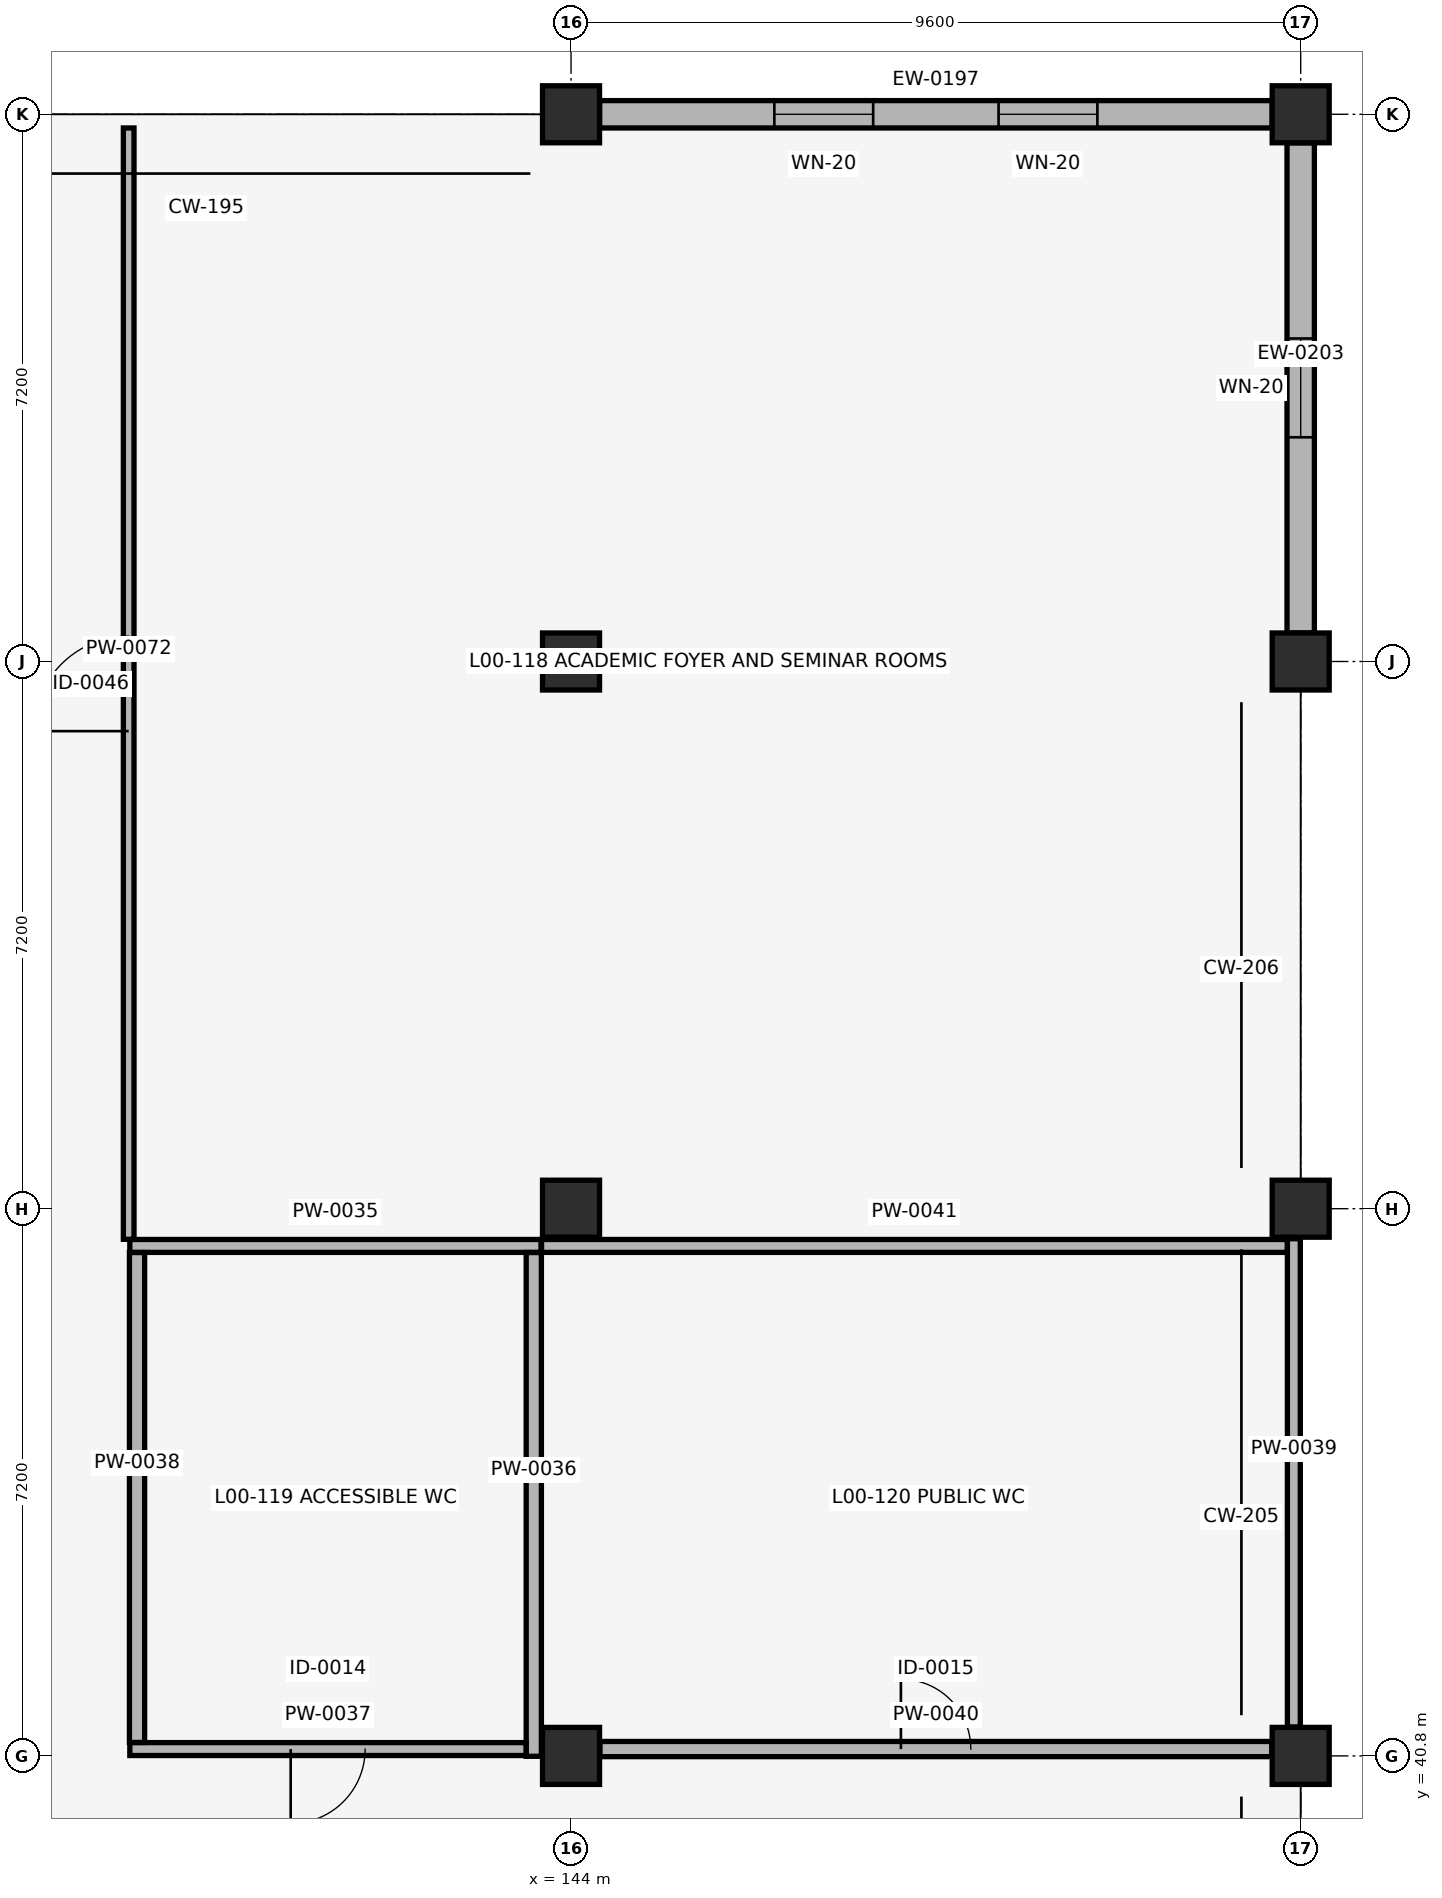
"""IFC4 building model, lengths in metres.
Left out: names, types, materials, properties, quantities, classifications, styles, units other than length and angle.
Written with IfcOpenShell. Run it as: python <this file> out.ifc"""

import sys

from ifc_helpers import new_model, si_unit, direction, frame, frame_2d, origin, origin_2d, place, context, subcontext, project, spatial, rectangle, circle, extrude, element, fill, save


model = new_model("IFC4")
c1 = context("Model", 3, precision=1e-05, world=origin(), true_north=direction((0.0, 1.0)))
c2 = subcontext(c1, "Body", "Model", "MODEL_VIEW")
j1 = project(units=[si_unit("LENGTHUNIT", "METRE"), si_unit("PLANEANGLEUNIT", "RADIAN")], contexts=[c1])
p1 = place(None, origin())
s1 = spatial("IfcSite", under=j1, at=p1, CompositionType="ELEMENT")
p2 = place(p1, origin())
s2 = spatial("IfcBuilding", under=s1, at=p2, CompositionType="ELEMENT")
p3 = place(p2, origin())
s3 = spatial("IfcBuildingStorey", under=s2, at=p3, CompositionType="ELEMENT", Elevation=0.0)
for number, where, z_axis, x_axis in (
    (1, (144.0, 40.8, -0.44), (0.0, 0.0, 1.0), (1.0, 0.0, 0.0)),
    (2, (144.0, 48.0, -0.44), (0.0, 0.0, 1.0), (1.0, 0.0, 0.0)),
    (3, (144.0, 55.2, -0.44), (0.0, 0.0, 1.0), (1.0, 0.0, 0.0)),
    (4, (144.0, 62.4, -0.44), (0.0, 0.0, 1.0), (1.0, 0.0, 0.0)),
    (5, (153.6, 40.8, -0.44), (0.0, 0.0, 1.0), (1.0, 0.0, 0.0)),
    (6, (153.6, 48.0, -0.44), (0.0, 0.0, 1.0), (1.0, 0.0, 0.0)),
    (7, (153.6, 55.2, -0.44), (0.0, 0.0, 1.0), (1.0, 0.0, 0.0)),
    (8, (153.6, 62.4, -0.44), (0.0, 0.0, 1.0), (1.0, 0.0, 0.0)),
):
    element("IfcColumn", number, at=place(p3, frame(where, z_axis=z_axis, x_axis=x_axis)), inside=s3, PredefinedType="COLUMN", context=c2, shape_type="SweptSolid", body=[
        extrude(circle(Radius=0.375, at=origin_2d()), origin(), (0.0, 0.0, 1.0), 4.86),
    ])
p4 = place(p3, frame((153.225, 62.4, 0.0), z_axis=(0.0, 0.0, 1.0), x_axis=(-1.0, 0.0, 0.0)))
e9 = element("IfcWall", 9, at=p4, inside=s3, PredefinedType="SOLIDWALL", context=c2, shape_type="SweptSolid", body=[
    extrude(rectangle(XDim=8.85, YDim=0.36, at=frame_2d((4.425, 0.0))), origin(), (0.0, 0.0, 1.0), 3.4),
])
p5 = place(p4, frame((2.3, 0.0, 0.72)))
e10 = element("IfcOpeningElement", 10, at=p5, cuts=e9, PredefinedType="OPENING", context=c2, shape_type="SweptSolid", body=[
    extrude(rectangle(XDim=1.3, YDim=2.32, at=frame_2d((0.65, 1.16))), frame((0.0, 0.19, 0.0), z_axis=(0.0, -1.0, 0.0), x_axis=(1.0, 0.0, 0.0)), (0.0, 0.0, 1.0), 0.38),
])
p6 = place(p4, frame((5.25, 0.0, 0.72)))
e11 = element("IfcOpeningElement", 11, at=p6, cuts=e9, PredefinedType="OPENING", context=c2, shape_type="SweptSolid", body=[
    extrude(rectangle(XDim=1.3, YDim=2.32, at=frame_2d((0.65, 1.16))), frame((0.0, 0.19, 0.0), z_axis=(0.0, -1.0, 0.0), x_axis=(1.0, 0.0, 0.0)), (0.0, 0.0, 1.0), 0.38),
])
p7 = place(p3, frame((153.6, 55.575, 0.0), z_axis=(0.0, 0.0, 1.0), x_axis=(0.0, 1.0, 0.0)))
e12 = element("IfcWall", 12, at=p7, inside=s3, PredefinedType="SOLIDWALL", context=c2, shape_type="SweptSolid", body=[
    extrude(rectangle(XDim=6.45, YDim=0.36, at=frame_2d((3.225, 0.0))), origin(), (0.0, 0.0, 1.0), 3.4),
])
p8 = place(p7, frame((2.575, 0.0, 0.72)))
e13 = element("IfcOpeningElement", 13, at=p8, cuts=e12, PredefinedType="OPENING", context=c2, shape_type="SweptSolid", body=[
    extrude(rectangle(XDim=1.3, YDim=2.32, at=frame_2d((0.65, 1.16))), frame((0.0, 0.19, 0.0), z_axis=(0.0, -1.0, 0.0), x_axis=(1.0, 0.0, 0.0)), (0.0, 0.0, 1.0), 0.38),
])
p9 = place(p3, frame((138.195, 47.51, 0.0), z_axis=(0.0, 0.0, 1.0), x_axis=(1.0, 0.0, 0.0)))
e14 = element("IfcWall", 14, at=p9, inside=s3, PredefinedType="PLUMBINGWALL", context=c2, shape_type="SweptSolid", body=[
    extrude(rectangle(XDim=5.41, YDim=0.17, at=frame_2d((2.705, 0.0))), origin(), (0.0, 0.0, 1.0), 3.46),
])
p10 = place(p3, frame((143.51, 40.795, 0.0), z_axis=(0.0, 0.0, 1.0), x_axis=(0.0, 1.0, 0.0)))
e15 = element("IfcWall", 15, at=p10, inside=s3, PredefinedType="PLUMBINGWALL", context=c2, shape_type="SweptSolid", body=[
    extrude(rectangle(XDim=6.628, YDim=0.2, at=frame_2d((3.314, 0.0))), origin(), (0.0, 0.0, 1.0), 3.4),
])
p11 = place(p3, frame((138.195, 40.89, 0.0), z_axis=(0.0, 0.0, 1.0), x_axis=(1.0, 0.0, 0.0)))
e16 = element("IfcWall", 16, at=p11, inside=s3, PredefinedType="PLUMBINGWALL", context=c2, shape_type="SweptSolid", body=[
    extrude(rectangle(XDim=5.213, YDim=0.17, at=frame_2d((2.606, 0.0))), origin(), (0.0, 0.0, 1.0), 3.4),
])
p12 = place(p11, frame((2.116, 0.0, 0.0)))
e17 = element("IfcOpeningElement", 17, at=p12, cuts=e16, PredefinedType="OPENING", context=c2, shape_type="SweptSolid", body=[
    extrude(rectangle(XDim=0.98, YDim=2.08, at=frame_2d((0.49, 1.04))), frame((0.0, 0.095, 0.0), z_axis=(0.0, -1.0, 0.0), x_axis=(1.0, 0.0, 0.0)), (0.0, 0.0, 1.0), 0.19),
])
p13 = place(p3, frame((138.29, 40.977, 0.0), z_axis=(0.0, 0.0, 1.0), x_axis=(0.0, 1.0, 0.0)))
e18 = element("IfcWall", 18, at=p13, inside=s3, PredefinedType="PLUMBINGWALL", context=c2, shape_type="SweptSolid", body=[
    extrude(rectangle(XDim=6.446, YDim=0.2, at=frame_2d((3.223, 0.0))), origin(), (0.0, 0.0, 1.0), 3.4),
])
p14 = place(p3, frame((153.51, 41.18, 0.0), z_axis=(0.0, 0.0, 1.0), x_axis=(0.0, 1.0, 0.0)))
e19 = element("IfcWall", 19, at=p14, inside=s3, PredefinedType="PLUMBINGWALL", context=c2, shape_type="SweptSolid", body=[
    extrude(rectangle(XDim=6.425, YDim=0.17, at=frame_2d((3.212, 0.0))), origin(), (0.0, 0.0, 1.0), 3.4),
])
p15 = place(p3, frame((144.38, 40.89, 0.0), z_axis=(0.0, 0.0, 1.0), x_axis=(1.0, 0.0, 0.0)))
e20 = element("IfcWall", 20, at=p15, inside=s3, PredefinedType="PLUMBINGWALL", context=c2, shape_type="SweptSolid", body=[
    extrude(rectangle(XDim=8.84, YDim=0.2, at=frame_2d((4.42, 0.0))), origin(), (0.0, 0.0, 1.0), 3.4),
])
p16 = place(p15, frame((3.96, 0.0, 0.0)))
e21 = element("IfcOpeningElement", 21, at=p16, cuts=e20, PredefinedType="OPENING", context=c2, shape_type="SweptSolid", body=[
    extrude(rectangle(XDim=0.92, YDim=2.08, at=frame_2d((0.46, 1.04))), frame((0.0, 0.11, 0.0), z_axis=(0.0, -1.0, 0.0), x_axis=(1.0, 0.0, 0.0)), (0.0, 0.0, 1.0), 0.22),
])
p17 = place(p3, frame((143.612, 47.51, 0.0), z_axis=(0.0, 0.0, 1.0), x_axis=(1.0, 0.0, 0.0)))
e22 = element("IfcWall", 22, at=p17, inside=s3, PredefinedType="PLUMBINGWALL", context=c2, shape_type="SweptSolid", body=[
    extrude(rectangle(XDim=9.811, YDim=0.17, at=frame_2d((4.906, 0.0))), origin(), (0.0, 0.0, 1.0), 3.4),
])
p18 = place(p3, frame((138.18, 47.597, 0.0), z_axis=(0.0, 0.0, 1.0), x_axis=(0.0, 1.0, 0.0)))
e23 = element("IfcWall", 23, at=p18, inside=s3, PredefinedType="PARTITIONING", context=c2, shape_type="SweptSolid", body=[
    extrude(rectangle(XDim=14.623, YDim=0.14, at=frame_2d((7.312, 0.0))), origin(), (0.0, 0.0, 1.0), 3.4),
])
p19 = place(p18, frame((6.687, 0.0, 0.0)))
e24 = element("IfcOpeningElement", 24, at=p19, cuts=e23, PredefinedType="OPENING", context=c2, shape_type="SweptSolid", body=[
    extrude(rectangle(XDim=1.25, YDim=2.12, at=frame_2d((0.625, 1.06))), frame((0.0, 0.08, 0.0), z_axis=(0.0, -1.0, 0.0), x_axis=(1.0, 0.0, 0.0)), (0.0, 0.0, 1.0), 0.16),
])
p20 = place(p5, origin())
e25 = element("IfcWindow", 25, at=p20, inside=s3, PartitioningType="SINGLE_PANEL", PredefinedType="WINDOW", context=c2, shape_type="SweptSolid", body=[
    extrude(rectangle(XDim=1.3, YDim=2.32, at=frame_2d((0.65, 1.16))), frame((0.0, 0.03, 0.0), z_axis=(0.0, -1.0, 0.0), x_axis=(1.0, 0.0, 0.0)), (0.0, 0.0, 1.0), 0.06),
])
fill(e10, e25)
p21 = place(p6, origin())
e26 = element("IfcWindow", 26, at=p21, inside=s3, PartitioningType="SINGLE_PANEL", PredefinedType="WINDOW", context=c2, shape_type="SweptSolid", body=[
    extrude(rectangle(XDim=1.3, YDim=2.32, at=frame_2d((0.65, 1.16))), frame((0.0, 0.03, 0.0), z_axis=(0.0, -1.0, 0.0), x_axis=(1.0, 0.0, 0.0)), (0.0, 0.0, 1.0), 0.06),
])
fill(e11, e26)
p22 = place(p8, origin())
e27 = element("IfcWindow", 27, at=p22, inside=s3, PartitioningType="SINGLE_PANEL", PredefinedType="WINDOW", context=c2, shape_type="SweptSolid", body=[
    extrude(rectangle(XDim=1.3, YDim=2.32, at=frame_2d((0.65, 1.16))), frame((0.0, 0.03, 0.0), z_axis=(0.0, -1.0, 0.0), x_axis=(1.0, 0.0, 0.0)), (0.0, 0.0, 1.0), 0.06),
])
fill(e13, e27)
p23 = place(p12, origin())
e28 = element("IfcDoor", 28, at=p23, inside=s3, OperationType="SINGLE_SWING_RIGHT", PredefinedType="DOOR", context=c2, shape_type="SweptSolid", body=[
    extrude(rectangle(XDim=0.98, YDim=2.08, at=frame_2d((0.49, 1.04))), frame((0.0, 0.025, 0.0), z_axis=(0.0, -1.0, 0.0), x_axis=(1.0, 0.0, 0.0)), (0.0, 0.0, 1.0), 0.05),
])
fill(e17, e28)
p24 = place(p16, origin())
e29 = element("IfcDoor", 29, at=p24, inside=s3, OperationType="SINGLE_SWING_LEFT", PredefinedType="DOOR", context=c2, shape_type="SweptSolid", body=[
    extrude(rectangle(XDim=0.92, YDim=2.08, at=frame_2d((0.46, 1.04))), frame((0.0, 0.025, 0.0), z_axis=(0.0, -1.0, 0.0), x_axis=(1.0, 0.0, 0.0)), (0.0, 0.0, 1.0), 0.05),
])
fill(e21, e29)
p25 = place(p19, origin())
e30 = element("IfcDoor", 30, at=p25, inside=s3, OperationType="SINGLE_SWING_LEFT", PredefinedType="DOOR", context=c2, shape_type="SweptSolid", body=[
    extrude(rectangle(XDim=1.25, YDim=2.12, at=frame_2d((0.625, 1.06))), frame((0.0, 0.025, 0.0), z_axis=(0.0, -1.0, 0.0), x_axis=(1.0, 0.0, 0.0)), (0.0, 0.0, 1.0), 0.05),
])
fill(e24, e30)
save(model, sys.argv[1])
